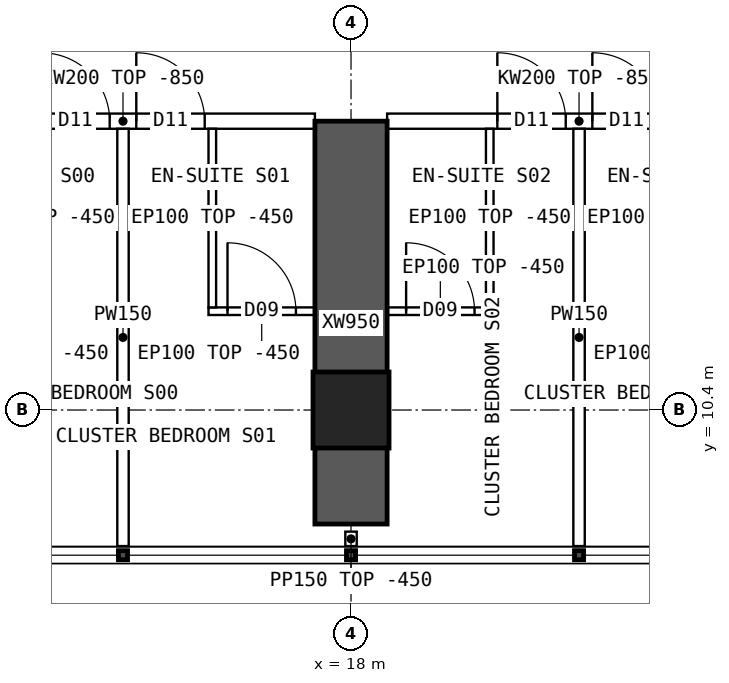
"""IFC4 building model, lengths in metres.
Left out: names, types, materials, properties, quantities, classifications, styles, units other than length and angle.
Written with IfcOpenShell. Run it as: python <this file> out.ifc"""

import sys

from ifc_helpers import new_model, si_unit, direction, frame, frame_2d, origin, origin_2d, place, context, subcontext, project, spatial, polyline, rectangle, hollow_rectangle, outline, extrude, element, fill, save


model = new_model("IFC4")
c1 = context("Model", 3, precision=1e-05, world=origin(), true_north=direction((0.0, 1.0)))
c2 = subcontext(c1, "Body", "Model", "MODEL_VIEW")
j1 = project(units=[si_unit("LENGTHUNIT", "METRE"), si_unit("PLANEANGLEUNIT", "RADIAN")], contexts=[c1])
p1 = place(None, origin())
s1 = spatial("IfcSite", under=j1, at=p1, CompositionType="ELEMENT")
p2 = place(p1, origin())
s2 = spatial("IfcBuilding", under=s1, at=p2, CompositionType="ELEMENT")
p3 = place(p2, frame((0.0, 0.0, 80.65)))
s3 = spatial("IfcBuildingStorey", under=s2, at=p3, CompositionType="ELEMENT", Elevation=80.65)
p4 = place(p3, frame((18.0, 10.4, 0.0), z_axis=(0.0, 0.0, 1.0), x_axis=(1.0, 0.0, 0.0)))
e1 = element("IfcColumn", 1, at=p4, inside=s3, PredefinedType="COLUMN", context=c2, shape_type="SweptSolid", body=[
    extrude(hollow_rectangle(XDim=1.0, YDim=1.0, WallThickness=0.1, at=origin_2d()), origin(), (0.0, 0.0, 1.0), 3.75),
])
p5 = place(p3, frame((18.0, 8.9, 0.0), z_axis=(0.0, 0.0, 1.0), x_axis=(0.0, 1.0, 0.0)))
e2 = element("IfcWall", 2, at=p5, inside=s3, PredefinedType="SHEAR", context=c2, shape_type="SweptSolid", body=[
    extrude(rectangle(XDim=5.3, YDim=0.95, at=frame_2d((2.65, 0.0))), origin(), (0.0, 0.0, 1.0), 3.75),
])
p6 = place(p3, frame((12.475, 14.2, 0.0), z_axis=(0.0, 0.0, 1.0), x_axis=(1.0, 0.0, 0.0)))
e3 = element("IfcWall", 3, at=p6, inside=s3, PredefinedType="SOLIDWALL", context=c2, shape_type="SweptSolid", body=[
    extrude(outline(polyline([(0.0, 0.0), (5.05, 0.0), (5.05, 2.9), (0.0, 2.9), (0.0, 0.0)])), frame((0.0, 0.1, 0.0), z_axis=(0.0, -1.0, 0.0), x_axis=(1.0, 0.0, 0.0)), (0.0, 0.0, 1.0), 0.2),
])
p7 = place(p6, frame((1.45, 0.0, 0.0)))
e4 = element("IfcOpeningElement", 4, at=p7, cuts=e3, PredefinedType="OPENING", context=c2, shape_type="SweptSolid", body=[
    extrude(rectangle(XDim=0.9, YDim=2.1, at=frame_2d((0.45, 1.05))), frame((0.0, 0.11, 0.0), z_axis=(0.0, -1.0, 0.0), x_axis=(1.0, 0.0, 0.0)), (0.0, 0.0, 1.0), 0.22),
])
p8 = place(p6, frame((2.7, 0.0, 0.0)))
e5 = element("IfcOpeningElement", 5, at=p8, cuts=e3, PredefinedType="OPENING", context=c2, shape_type="SweptSolid", body=[
    extrude(rectangle(XDim=0.9, YDim=2.1, at=frame_2d((0.45, 1.05))), frame((0.0, 0.11, 0.0), z_axis=(0.0, -1.0, 0.0), x_axis=(1.0, 0.0, 0.0)), (0.0, 0.0, 1.0), 0.22),
])
p9 = place(p3, frame((18.475, 14.2, 0.0), z_axis=(0.0, 0.0, 1.0), x_axis=(1.0, 0.0, 0.0)))
e6 = element("IfcWall", 6, at=p9, inside=s3, PredefinedType="SOLIDWALL", context=c2, shape_type="SweptSolid", body=[
    extrude(outline(polyline([(0.0, 0.0), (5.05, 0.0), (5.05, 2.9), (0.0, 2.9), (0.0, 0.0)])), frame((0.0, 0.1, 0.0), z_axis=(0.0, -1.0, 0.0), x_axis=(1.0, 0.0, 0.0)), (0.0, 0.0, 1.0), 0.2),
])
p10 = place(p9, frame((1.45, 0.0, 0.0)))
e7 = element("IfcOpeningElement", 7, at=p10, cuts=e6, PredefinedType="OPENING", context=c2, shape_type="SweptSolid", body=[
    extrude(rectangle(XDim=0.9, YDim=2.1, at=frame_2d((0.45, 1.05))), frame((0.0, 0.11, 0.0), z_axis=(0.0, -1.0, 0.0), x_axis=(1.0, 0.0, 0.0)), (0.0, 0.0, 1.0), 0.22),
])
p11 = place(p9, frame((2.7, 0.0, 0.0)))
e8 = element("IfcOpeningElement", 8, at=p11, cuts=e6, PredefinedType="OPENING", context=c2, shape_type="SweptSolid", body=[
    extrude(rectangle(XDim=0.9, YDim=2.1, at=frame_2d((0.45, 1.05))), frame((0.0, 0.11, 0.0), z_axis=(0.0, -1.0, 0.0), x_axis=(1.0, 0.0, 0.0)), (0.0, 0.0, 1.0), 0.22),
])
p12 = place(p3, frame((15.0, 8.61, 0.0), z_axis=(0.0, 0.0, 1.0), x_axis=(0.0, 1.0, 0.0)))
e9 = element("IfcWall", 9, at=p12, inside=s3, PredefinedType="PARTITIONING", context=c2, shape_type="SweptSolid", body=[
    extrude(outline(polyline([(0.0, 0.0), (5.49, 0.0), (5.49, 2.9), (5.442, 2.9), (5.44, 3.3), (1.992, 3.3), (1.99, 2.9), (1.592, 2.9), (1.59, 3.3), (0.0, 3.3), (0.0, 0.0)])), frame((0.0, 0.075, 0.0), z_axis=(0.0, -1.0, 0.0), x_axis=(1.0, 0.0, 0.0)), (0.0, 0.0, 1.0), 0.15),
])
p13 = place(p3, frame((17.525, 11.7, 0.0), z_axis=(0.0, 0.0, 1.0), x_axis=(-1.0, 0.0, 0.0)))
e10 = element("IfcWall", 10, at=p13, inside=s3, PredefinedType="PARTITIONING", context=c2, shape_type="SweptSolid", body=[
    extrude(rectangle(XDim=1.4, YDim=0.1, at=frame_2d((0.7, 0.0))), origin(), (0.0, 0.0, 1.0), 3.3),
])
p14 = place(p13, frame((0.25, 0.0, 0.0)))
e11 = element("IfcOpeningElement", 11, at=p14, cuts=e10, PredefinedType="OPENING", context=c2, shape_type="SweptSolid", body=[
    extrude(rectangle(XDim=0.9, YDim=2.1, at=frame_2d((0.45, 1.05))), frame((0.0, 0.06, 0.0), z_axis=(0.0, -1.0, 0.0), x_axis=(1.0, 0.0, 0.0)), (0.0, 0.0, 1.0), 0.12),
])
p15 = place(p3, frame((16.175, 11.75, 0.0), z_axis=(0.0, 0.0, 1.0), x_axis=(0.0, 1.0, 0.0)))
e12 = element("IfcWall", 12, at=p15, inside=s3, PredefinedType="PARTITIONING", context=c2, shape_type="SweptSolid", body=[
    extrude(outline(polyline([(0.0, 0.0), (2.35, 0.0), (2.35, 2.9), (2.302, 2.9), (2.3, 3.3), (0.0, 3.3), (0.0, 0.0)])), frame((0.0, 0.05, 0.0), z_axis=(0.0, -1.0, 0.0), x_axis=(1.0, 0.0, 0.0)), (0.0, 0.0, 1.0), 0.1),
])
p16 = place(p3, frame((21.0, 8.61, 0.0), z_axis=(0.0, 0.0, 1.0), x_axis=(0.0, 1.0, 0.0)))
e13 = element("IfcWall", 13, at=p16, inside=s3, PredefinedType="PARTITIONING", context=c2, shape_type="SweptSolid", body=[
    extrude(outline(polyline([(0.0, 0.0), (5.49, 0.0), (5.49, 2.9), (5.442, 2.9), (5.44, 3.3), (1.992, 3.3), (1.99, 2.9), (1.592, 2.9), (1.59, 3.3), (0.0, 3.3), (0.0, 0.0)])), frame((0.0, 0.075, 0.0), z_axis=(0.0, -1.0, 0.0), x_axis=(1.0, 0.0, 0.0)), (0.0, 0.0, 1.0), 0.15),
])
p17 = place(p3, frame((19.875, 11.7, 0.0), z_axis=(0.0, 0.0, 1.0), x_axis=(-1.0, 0.0, 0.0)))
e14 = element("IfcWall", 14, at=p17, inside=s3, PredefinedType="PARTITIONING", context=c2, shape_type="SweptSolid", body=[
    extrude(rectangle(XDim=1.4, YDim=0.1, at=frame_2d((0.7, 0.0))), origin(), (0.0, 0.0, 1.0), 3.3),
])
p18 = place(p17, frame((0.25, 0.0, 0.0)))
e15 = element("IfcOpeningElement", 15, at=p18, cuts=e14, PredefinedType="OPENING", context=c2, shape_type="SweptSolid", body=[
    extrude(rectangle(XDim=0.9, YDim=2.1, at=frame_2d((0.45, 1.05))), frame((0.0, 0.06, 0.0), z_axis=(0.0, -1.0, 0.0), x_axis=(1.0, 0.0, 0.0)), (0.0, 0.0, 1.0), 0.12),
])
p19 = place(p3, frame((19.825, 11.75, 0.0), z_axis=(0.0, 0.0, 1.0), x_axis=(0.0, 1.0, 0.0)))
e16 = element("IfcWall", 16, at=p19, inside=s3, PredefinedType="PARTITIONING", context=c2, shape_type="SweptSolid", body=[
    extrude(outline(polyline([(0.0, 0.0), (2.35, 0.0), (2.35, 2.9), (2.302, 2.9), (2.3, 3.3), (0.0, 3.3), (0.0, 0.0)])), frame((0.0, 0.05, 0.0), z_axis=(0.0, -1.0, 0.0), x_axis=(1.0, 0.0, 0.0)), (0.0, 0.0, 1.0), 0.1),
])
p20 = place(p3, frame((18.0, 8.8, 0.0), z_axis=(0.0, 0.0, 1.0), x_axis=(0.0, -1.0, 0.0)))
e17 = element("IfcWall", 17, at=p20, inside=s3, PredefinedType="PARTITIONING", context=c2, shape_type="SweptSolid", body=[
    extrude(rectangle(XDim=0.19, YDim=0.15, at=frame_2d((0.095, 0.0))), origin(), (0.0, 0.0, 1.0), 3.3),
])
p21 = place(p7, origin())
e18 = element("IfcDoor", 18, at=p21, inside=s3, OperationType="SINGLE_SWING_LEFT", PredefinedType="DOOR", context=c2, shape_type="SweptSolid", body=[
    extrude(rectangle(XDim=0.9, YDim=2.1, at=frame_2d((0.45, 1.05))), frame((0.0, 0.025, 0.0), z_axis=(0.0, -1.0, 0.0), x_axis=(1.0, 0.0, 0.0)), (0.0, 0.0, 1.0), 0.05),
])
fill(e4, e18)
p22 = place(p14, origin())
e19 = element("IfcDoor", 19, at=p22, inside=s3, OperationType="SINGLE_SWING_RIGHT", PredefinedType="DOOR", context=c2, shape_type="SweptSolid", body=[
    extrude(rectangle(XDim=0.9, YDim=2.1, at=frame_2d((0.45, 1.05))), frame((0.0, 0.025, 0.0), z_axis=(0.0, -1.0, 0.0), x_axis=(1.0, 0.0, 0.0)), (0.0, 0.0, 1.0), 0.05),
])
fill(e11, e19)
p23 = place(p8, origin())
e20 = element("IfcDoor", 20, at=p23, inside=s3, OperationType="SINGLE_SWING_LEFT", PredefinedType="DOOR", context=c2, shape_type="SweptSolid", body=[
    extrude(rectangle(XDim=0.9, YDim=2.1, at=frame_2d((0.45, 1.05))), frame((0.0, 0.025, 0.0), z_axis=(0.0, -1.0, 0.0), x_axis=(1.0, 0.0, 0.0)), (0.0, 0.0, 1.0), 0.05),
])
fill(e5, e20)
p24 = place(p18, origin())
e21 = element("IfcDoor", 21, at=p24, inside=s3, OperationType="SINGLE_SWING_RIGHT", PredefinedType="DOOR", context=c2, shape_type="SweptSolid", body=[
    extrude(rectangle(XDim=0.9, YDim=2.1, at=frame_2d((0.45, 1.05))), frame((0.0, 0.025, 0.0), z_axis=(0.0, -1.0, 0.0), x_axis=(1.0, 0.0, 0.0)), (0.0, 0.0, 1.0), 0.05),
])
fill(e15, e21)
p25 = place(p10, origin())
e22 = element("IfcDoor", 22, at=p25, inside=s3, OperationType="SINGLE_SWING_LEFT", PredefinedType="DOOR", context=c2, shape_type="SweptSolid", body=[
    extrude(rectangle(XDim=0.9, YDim=2.1, at=frame_2d((0.45, 1.05))), frame((0.0, 0.025, 0.0), z_axis=(0.0, -1.0, 0.0), x_axis=(1.0, 0.0, 0.0)), (0.0, 0.0, 1.0), 0.05),
])
fill(e7, e22)
p26 = place(p11, origin())
e23 = element("IfcDoor", 23, at=p26, inside=s3, OperationType="SINGLE_SWING_LEFT", PredefinedType="DOOR", context=c2, shape_type="SweptSolid", body=[
    extrude(rectangle(XDim=0.9, YDim=2.1, at=frame_2d((0.45, 1.05))), frame((0.0, 0.025, 0.0), z_axis=(0.0, -1.0, 0.0), x_axis=(1.0, 0.0, 0.0)), (0.0, 0.0, 1.0), 0.05),
])
fill(e8, e23)
save(model, sys.argv[1])
